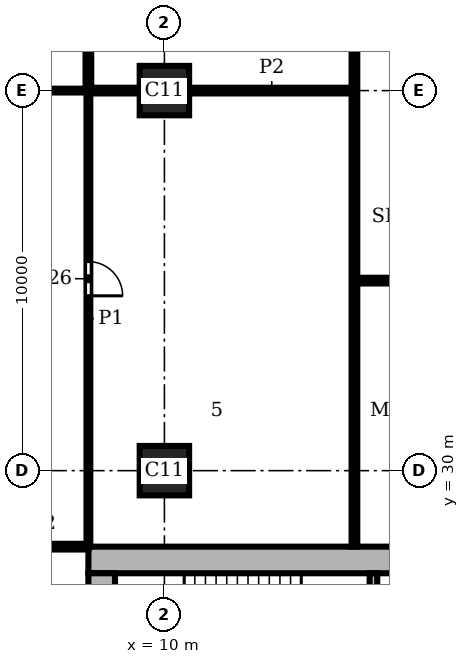
"""IFC4 building model, lengths in metres.
Left out: names, types, materials, properties, quantities, classifications, styles, units other than length and angle.
Written with IfcOpenShell. Run it as: python <this file> out.ifc"""

import sys

from ifc_helpers import new_model, si_unit, direction, frame, frame_2d, origin, origin_2d, place, context, subcontext, project, spatial, rectangle, extrude, element, fill, save


model = new_model("IFC4")
c1 = context("Model", 3, precision=1e-05, world=origin(), true_north=direction((0.0, 1.0)))
c2 = subcontext(c1, "Body", "Model", "MODEL_VIEW")
j1 = project(units=[si_unit("LENGTHUNIT", "METRE"), si_unit("PLANEANGLEUNIT", "RADIAN")], contexts=[c1])
p1 = place(None, origin())
s1 = spatial("IfcSite", under=j1, at=p1, CompositionType="ELEMENT")
p2 = place(p1, origin())
s2 = spatial("IfcBuilding", under=s1, at=p2, CompositionType="ELEMENT")
p3 = place(p2, frame((0.0, 0.0, 201.9)))
s3 = spatial("IfcBuildingStorey", under=s2, at=p3, CompositionType="ELEMENT", Elevation=201.9)
for number, where, z_axis, x_axis in (
    (1, (10.0, 30.0, 0.0), (0.0, 0.0, 1.0), (1.0, 0.0, 0.0)),
    (2, (10.0, 40.0, 0.0), (0.0, 0.0, 1.0), (1.0, 0.0, 0.0)),
):
    element("IfcColumn", number, at=place(p3, frame(where, z_axis=z_axis, x_axis=x_axis)), inside=s3, PredefinedType="COLUMN", context=c2, shape_type="SweptSolid", body=[
        extrude(rectangle(XDim=1.3, YDim=1.3, at=origin_2d()), origin(), (0.0, 0.0, 1.0), 3.9),
    ])
p4 = place(p3, frame((28.0, 27.65, 0.0), z_axis=(0.0, 0.0, 1.0), x_axis=(-1.0, 0.0, 0.0)))
e3 = element("IfcWall", 3, at=p4, inside=s3, PredefinedType="SHEAR", context=c2, shape_type="SweptSolid", body=[
    extrude(rectangle(XDim=20.0, YDim=0.7, at=frame_2d((10.0, 0.0))), origin(), (0.0, 0.0, 1.0), 3.9),
])
p5 = place(p3, frame((8.35, 27.3, 0.0), z_axis=(0.0, 0.0, 1.0), x_axis=(0.0, -1.0, 0.0)))
e4 = element("IfcWall", 4, at=p5, inside=s3, PredefinedType="SHEAR", context=c2, shape_type="SweptSolid", body=[
    extrude(rectangle(XDim=18.6, YDim=0.7, at=frame_2d((9.3, 0.0))), origin(), (0.0, 0.0, 1.0), 3.9),
])
p6 = place(p3, frame((15.5, 23.6, 0.0), z_axis=(0.0, 0.0, 1.0), x_axis=(0.0, 1.0, 0.0)))
e5 = element("IfcWall", 5, at=p6, inside=s3, PredefinedType="SHEAR", context=c2, shape_type="SweptSolid", body=[
    extrude(rectangle(XDim=3.7, YDim=0.2, at=frame_2d((1.85, 0.0))), origin(), (0.0, 0.0, 1.0), 3.58),
])
p7 = place(p3, frame((8.0, 28.0, 0.0), z_axis=(0.0, 0.0, 1.0), x_axis=(0.0, 1.0, 0.0)))
e6 = element("IfcWall", 6, at=p7, inside=s3, PredefinedType="PARTITIONING", context=c2, shape_type="SweptSolid", body=[
    extrude(rectangle(XDim=12.0, YDim=0.1, at=frame_2d((6.0, 0.0))), origin(), (0.0, 0.0, 1.0), 3.58),
])
p8 = place(p7, frame((6.6, 0.0, 0.0)))
e7 = element("IfcOpeningElement", 7, at=p8, cuts=e6, PredefinedType="OPENING", context=c2, shape_type="SweptSolid", body=[
    extrude(rectangle(XDim=0.9, YDim=2.1, at=frame_2d((0.45, 1.05))), frame((0.0, 0.06, 0.0), z_axis=(0.0, -1.0, 0.0), x_axis=(1.0, 0.0, 0.0)), (0.0, 0.0, 1.0), 0.12),
])
p9 = place(p3, frame((0.45, 40.0, 0.0), z_axis=(0.0, 0.0, 1.0), x_axis=(1.0, 0.0, 0.0)))
e8 = element("IfcWall", 8, at=p9, inside=s3, PredefinedType="PARTITIONING", context=c2, shape_type="SweptSolid", body=[
    extrude(rectangle(XDim=7.55, YDim=0.1, at=frame_2d((3.775, 0.0))), origin(), (0.0, 0.0, 1.0), 3.58),
])
p10 = place(p9, frame((2.975, 0.0, 0.0)))
e9 = element("IfcOpeningElement", 9, at=p10, cuts=e8, PredefinedType="OPENING", context=c2, shape_type="SweptSolid", body=[
    extrude(rectangle(XDim=0.95, YDim=2.1, at=frame_2d((0.475, 1.05))), frame((0.0, 0.06, 0.0), z_axis=(0.0, -1.0, 0.0), x_axis=(1.0, 0.0, 0.0)), (0.0, 0.0, 1.0), 0.12),
])
p11 = place(p3, frame((8.0, 40.0, 0.0), z_axis=(0.0, 0.0, 1.0), x_axis=(0.0, 1.0, 0.0)))
e10 = element("IfcWall", 10, at=p11, inside=s3, PredefinedType="PARTITIONING", context=c2, shape_type="SweptSolid", body=[
    extrude(rectangle(XDim=10.0, YDim=0.15, at=frame_2d((5.0, 0.0))), origin(), (0.0, 0.0, 1.0), 3.58),
])
p12 = place(p3, frame((15.0, 28.0, 0.0), z_axis=(0.0, 0.0, 1.0), x_axis=(0.0, 1.0, 0.0)))
e11 = element("IfcWall", 11, at=p12, inside=s3, PredefinedType="PARTITIONING", context=c2, shape_type="SweptSolid", body=[
    extrude(rectangle(XDim=29.6, YDim=0.15, at=frame_2d((14.8, 0.0))), origin(), (0.0, 0.0, 1.0), 3.58),
])
p13 = place(p3, frame((5.6, 28.0, 0.0), z_axis=(0.0, 0.0, 1.0), x_axis=(1.0, 0.0, 0.0)))
e12 = element("IfcWall", 12, at=p13, inside=s3, PredefinedType="PARTITIONING", context=c2, shape_type="SweptSolid", body=[
    extrude(rectangle(XDim=2.4, YDim=0.15, at=frame_2d((1.2, 0.0))), origin(), (0.0, 0.0, 1.0), 3.58),
])
p14 = place(p3, frame((15.0, 35.0, 0.0), z_axis=(0.0, 0.0, 1.0), x_axis=(1.0, 0.0, 0.0)))
e13 = element("IfcWall", 13, at=p14, inside=s3, PredefinedType="PARTITIONING", context=c2, shape_type="SweptSolid", body=[
    extrude(rectangle(XDim=11.0, YDim=0.15, at=frame_2d((5.5, 0.0))), origin(), (0.0, 0.0, 1.0), 3.58),
])
p15 = place(p3, frame((8.0, 40.0, 0.0), z_axis=(0.0, 0.0, 1.0), x_axis=(1.0, 0.0, 0.0)))
e14 = element("IfcWall", 14, at=p15, inside=s3, PredefinedType="PARTITIONING", context=c2, shape_type="SweptSolid", body=[
    extrude(rectangle(XDim=1.35, YDim=0.15, at=frame_2d((0.675, 0.0))), origin(), (0.0, 0.0, 1.0), 3.58),
])
p16 = place(p3, frame((10.65, 40.0, 0.0), z_axis=(0.0, 0.0, 1.0), x_axis=(1.0, 0.0, 0.0)))
e15 = element("IfcWall", 15, at=p16, inside=s3, PredefinedType="PARTITIONING", context=c2, shape_type="SweptSolid", body=[
    extrude(rectangle(XDim=4.35, YDim=0.15, at=frame_2d((2.175, 0.0))), origin(), (0.0, 0.0, 1.0), 3.58),
])
p17 = place(p8, frame((0.9, 0.0, 0.0), z_axis=(0.0, 0.0, 1.0), x_axis=(-1.0, 0.0, 0.0)))
e16 = element("IfcDoor", 16, at=p17, inside=s3, OperationType="SINGLE_SWING_RIGHT", PredefinedType="DOOR", context=c2, shape_type="SweptSolid", body=[
    extrude(rectangle(XDim=0.9, YDim=2.1, at=frame_2d((0.45, 1.05))), frame((0.0, 0.025, 0.0), z_axis=(0.0, -1.0, 0.0), x_axis=(1.0, 0.0, 0.0)), (0.0, 0.0, 1.0), 0.05),
])
fill(e7, e16)
save(model, sys.argv[1])
